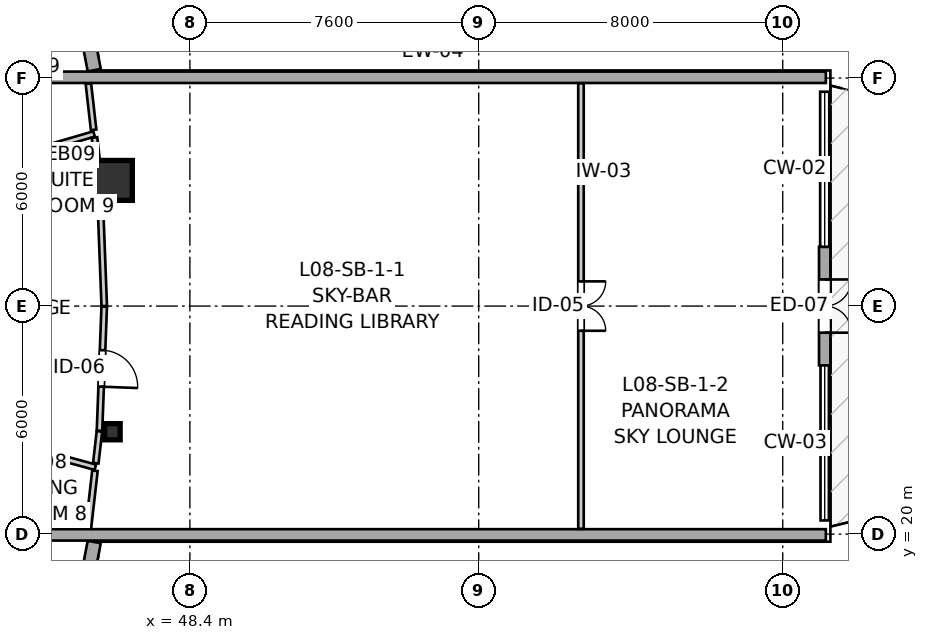
"""IFC4 building model, lengths in metres.
Left out: names, types, materials, properties, quantities, classifications, styles, units other than length and angle.
Written with IfcOpenShell. Run it as: python <this file> out.ifc"""

import sys

from ifc_helpers import new_model, si_unit, direction, frame, frame_2d, origin, origin_2d, place, context, subcontext, project, spatial, rectangle, i_section, extrude, source, transform, mapped, element, fill, save


model = new_model("IFC4")
c1 = context("Model", 3, precision=1e-05, world=origin(), true_north=direction((0.0, 1.0)))
c2 = subcontext(c1, "Body", "Model", "MODEL_VIEW")
j1 = project(units=[si_unit("LENGTHUNIT", "METRE"), si_unit("PLANEANGLEUNIT", "RADIAN")], contexts=[c1])
p1 = place(None, origin())
s1 = spatial("IfcSite", under=j1, at=p1, CompositionType="ELEMENT")
p2 = place(p1, origin())
s2 = spatial("IfcBuilding", under=s1, at=p2, CompositionType="ELEMENT")
p3 = place(p2, frame((0.0, 0.0, 30.2)))
s3 = spatial("IfcBuildingStorey", under=s2, at=p3, CompositionType="ELEMENT", Elevation=30.2)
m1 = source(origin(), c2, "Body", "SweptSolid", [
    extrude(i_section(OverallWidth=0.409, OverallDepth=0.425, WebThickness=0.03, FlangeThickness=0.048, FilletRadius=0.015, at=origin_2d()), origin(), (0.0, 0.0, 1.0), 2.935),
])
p4 = place(p3, frame((46.361, 22.694, 0.0), z_axis=(0.0, 0.0, 1.0), x_axis=(1.0, 0.0, 0.0)))
e1 = element("IfcColumn", 1, at=p4, inside=s3, PredefinedType="PILASTER", context=c2, shape_type="MappedRepresentation", body=[
    mapped(m1, transform((0.0, 0.0, 0.0), x_axis=(1.0, 0.0, 0.0), y_axis=(0.0, 1.0, 0.0), z_axis=(0.0, 0.0, 1.0), scale=1.0)),
])
m2 = source(origin(), c2, "Body", "SweptSolid", [
    extrude(rectangle(XDim=1.05, YDim=1.05, at=origin_2d()), origin(), (0.0, 0.0, 1.0), 2.935),
])
p5 = place(p3, frame((46.361, 29.306, 0.0), z_axis=(0.0, 0.0, 1.0), x_axis=(1.0, 0.0, 0.0)))
e2 = element("IfcColumn", 2, at=p5, inside=s3, PredefinedType="COLUMN", context=c2, shape_type="MappedRepresentation", body=[
    mapped(m2, transform((0.0, 0.0, 0.0), x_axis=(1.0, 0.0, 0.0), y_axis=(0.0, 1.0, 0.0), z_axis=(0.0, 0.0, 1.0), scale=1.0)),
])
p6 = place(p3, frame((45.24, 16.408, 0.0), z_axis=(0.0, 0.0, 1.0), x_axis=(0.186636709983, 0.982428999209, 0.0)))
e3 = element("IfcWall", 3, at=p6, inside=s3, PredefinedType="SOLIDWALL", context=c2, shape_type="SweptSolid", body=[
    extrude(rectangle(XDim=3.446, YDim=0.35, at=frame_2d((1.723, 0.0))), origin(), (0.0, 0.0, 1.0), 2.415),
])
p7 = place(p6, frame((0.828, 0.0, 0.82)))
e4 = element("IfcOpeningElement", 4, at=p7, cuts=e3, PredefinedType="OPENING", context=c2, shape_type="SweptSolid", body=[
    extrude(rectangle(XDim=1.45, YDim=1.25, at=frame_2d((0.725, 0.625))), frame((0.0, 0.185, 0.0), z_axis=(0.0, -1.0, 0.0), x_axis=(1.0, 0.0, 0.0)), (0.0, 0.0, 1.0), 0.37),
])
p8 = place(p3, frame((45.883, 32.207, 0.0), z_axis=(0.0, 0.0, 1.0), x_axis=(-0.186693533797, 0.982418202416, 0.0)))
e5 = element("IfcWall", 5, at=p8, inside=s3, PredefinedType="SOLIDWALL", context=c2, shape_type="SweptSolid", body=[
    extrude(rectangle(XDim=3.726, YDim=0.35, at=frame_2d((1.863, 0.0))), origin(), (0.0, 0.0, 1.0), 2.415),
])
p9 = place(p8, frame((1.313, 0.0, 0.82)))
e6 = element("IfcOpeningElement", 6, at=p9, cuts=e5, PredefinedType="OPENING", context=c2, shape_type="SweptSolid", body=[
    extrude(rectangle(XDim=1.45, YDim=1.25, at=frame_2d((0.725, 0.625))), frame((0.0, 0.185, 0.0), z_axis=(0.0, -1.0, 0.0), x_axis=(1.0, 0.0, 0.0)), (0.0, 0.0, 1.0), 0.37),
])
for number, where, z_axis, x_axis in (
    (7, (44.45, 32.02, 0.0), (0.0, 0.0, 1.0), (1.0, 0.0, 0.0)),
    (8, (44.45, 19.98, 0.0), (0.0, 0.0, 1.0), (1.0, 0.0, 0.0)),
):
    element("IfcWall", number, at=place(p3, frame(where, z_axis=z_axis, x_axis=x_axis)), inside=s3, PredefinedType="SOLIDWALL", context=c2, shape_type="SweptSolid", body=[
        extrude(rectangle(XDim=20.685, YDim=0.3, at=frame_2d((10.342, 0.0))), origin(), (0.0, 0.0, 1.0), 2.115),
    ])
p10 = place(p3, frame((65.104, 27.56, 0.0), z_axis=(0.0, 0.0, 1.0), x_axis=(0.0, -1.0, 0.0)))
e9 = element("IfcWall", 9, at=p10, inside=s3, PredefinedType="SOLIDWALL", context=c2, shape_type="SweptSolid", body=[
    extrude(rectangle(XDim=3.12, YDim=0.3, at=frame_2d((1.56, 0.0))), origin(), (0.0, 0.0, 1.0), 2.3),
])
p11 = place(p10, frame((0.86, 0.0, 0.0)))
e10 = element("IfcOpeningElement", 10, at=p11, cuts=e9, PredefinedType="OPENING", context=c2, shape_type="SweptSolid", body=[
    extrude(rectangle(XDim=1.4, YDim=2.15, at=frame_2d((0.7, 1.075))), frame((0.0, 0.16, 0.0), z_axis=(0.0, -1.0, 0.0), x_axis=(1.0, 0.0, 0.0)), (0.0, 0.0, 1.0), 0.32),
])
p12 = place(p3, frame((58.691, 31.862, 0.0), z_axis=(0.0, 0.0, 1.0), x_axis=(0.0, -1.0, 0.0)))
e11 = element("IfcWall", 11, at=p12, inside=s3, PredefinedType="PARTITIONING", context=c2, shape_type="SweptSolid", body=[
    extrude(rectangle(XDim=11.724, YDim=0.145, at=frame_2d((5.862, 0.0))), origin(), (0.0, 0.0, 1.0), 2.353),
])
p13 = place(p12, frame((5.212, 0.0, 0.0)))
e12 = element("IfcOpeningElement", 12, at=p13, cuts=e11, PredefinedType="OPENING", context=c2, shape_type="SweptSolid", body=[
    extrude(rectangle(XDim=1.3, YDim=2.1, at=frame_2d((0.65, 1.05))), frame((0.0, 0.083, 0.0), z_axis=(0.0, -1.0, 0.0), x_axis=(1.0, 0.0, 0.0)), (0.0, 0.0, 1.0), 0.165),
])
p14 = place(p3, frame((46.146, 25.985, 0.0), z_axis=(0.0, 0.0, 1.0), x_axis=(-0.038094618751, -0.999274136572, 0.0)))
e13 = element("IfcWall", 13, at=p14, inside=s3, PredefinedType="PARTITIONING", context=c2, shape_type="SweptSolid", body=[
    extrude(rectangle(XDim=3.269, YDim=0.145, at=frame_2d((1.634, 0.0))), origin(), (0.0, 0.0, 1.0), 2.403),
])
p15 = place(p14, frame((1.147, 0.0, 0.0)))
e14 = element("IfcOpeningElement", 14, at=p15, cuts=e13, PredefinedType="OPENING", context=c2, shape_type="SweptSolid", body=[
    extrude(rectangle(XDim=0.96, YDim=2.1, at=frame_2d((0.48, 1.05))), frame((0.0, 0.083, 0.0), z_axis=(0.0, -1.0, 0.0), x_axis=(1.0, 0.0, 0.0)), (0.0, 0.0, 1.0), 0.165),
])
p16 = place(p3, frame((38.81, 32.306, 0.0), z_axis=(0.0, 0.0, 1.0), x_axis=(0.801799720797, 0.597592844443, 0.0)))
e15 = element("IfcWall", 15, at=p16, inside=s3, PredefinedType="PARTITIONING", context=c2, shape_type="SweptSolid", body=[
    extrude(rectangle(XDim=7.424, YDim=0.145, at=frame_2d((3.712, 0.0))), origin(), (0.0, 0.0, 1.0), 2.935),
])
p17 = place(p3, frame((38.788, 28.46, 0.0), z_axis=(0.0, 0.0, 1.0), x_axis=(0.959983709987, 0.280055845432, 0.0)))
e16 = element("IfcWall", 16, at=p17, inside=s3, PredefinedType="PARTITIONING", context=c2, shape_type="SweptSolid", body=[
    extrude(rectangle(XDim=7.386, YDim=0.145, at=frame_2d((3.693, 0.0))), origin(), (0.0, 0.0, 1.0), 2.935),
])
p18 = place(p3, frame((38.787, 23.701, 0.0), z_axis=(0.0, 0.0, 1.0), x_axis=(0.964810342249, -0.262946769308, 0.0)))
e17 = element("IfcWall", 17, at=p18, inside=s3, PredefinedType="PARTITIONING", context=c2, shape_type="SweptSolid", body=[
    extrude(rectangle(XDim=7.385, YDim=0.145, at=frame_2d((3.692, 0.0))), origin(), (0.0, 0.0, 1.0), 2.935),
])
p19 = place(p3, frame((46.021, 29.281, 0.0), z_axis=(0.0, 0.0, 1.0), x_axis=(0.038070453861, -0.999275057501, 0.0)))
e18 = element("IfcWall", 18, at=p19, inside=s3, PredefinedType="PARTITIONING", context=c2, shape_type="SweptSolid", body=[
    extrude(rectangle(XDim=3.283, YDim=0.145, at=frame_2d((1.642, 0.0))), origin(), (0.0, 0.0, 1.0), 2.403),
])
p20 = place(p3, frame((45.729, 20.146, 0.0), z_axis=(0.0, 0.0, 1.0), x_axis=(0.113074294354, 0.993586535716, 0.0)))
e19 = element("IfcWall", 19, at=p20, inside=s3, PredefinedType="PARTITIONING", context=c2, shape_type="SweptSolid", body=[
    extrude(rectangle(XDim=1.531, YDim=0.145, at=frame_2d((0.765, 0.0))), origin(), (0.0, 0.0, 1.0), 2.403),
])
p21 = place(p3, frame((45.89, 30.436, 0.0), z_axis=(0.0, 0.0, 1.0), x_axis=(0.113024308153, -0.993592223081, 0.0)))
e20 = element("IfcWall", 20, at=p21, inside=s3, PredefinedType="PARTITIONING", context=c2, shape_type="SweptSolid", body=[
    extrude(rectangle(XDim=1.147, YDim=0.145, at=frame_2d((0.573, 0.0))), origin(), (0.0, 0.0, 1.0), 2.403),
])
p22 = place(p3, frame((45.729, 31.854, 0.0), z_axis=(0.0, 0.0, 1.0), x_axis=(0.112860473391, -0.993610846129, 0.0)))
e21 = element("IfcWall", 21, at=p22, inside=s3, PredefinedType="PARTITIONING", context=c2, shape_type="SweptSolid", body=[
    extrude(rectangle(XDim=1.224, YDim=0.145, at=frame_2d((0.612, 0.0))), origin(), (0.0, 0.0, 1.0), 2.403),
])
p23 = place(p3, frame((45.924, 21.866, 0.0), z_axis=(0.0, 0.0, 1.0), x_axis=(0.112844765803, 0.993612630169, 0.0)))
e22 = element("IfcWall", 22, at=p23, inside=s3, PredefinedType="PARTITIONING", context=c2, shape_type="SweptSolid", body=[
    extrude(rectangle(XDim=0.844, YDim=0.145, at=frame_2d((0.422, 0.0))), origin(), (0.0, 0.0, 1.0), 2.403),
])
m3 = source(origin(), c2, "Body", "SweptSolid", [
    extrude(rectangle(XDim=1.4, YDim=2.15, at=frame_2d((0.7, 1.075))), frame((0.0, 0.025, 0.0), z_axis=(0.0, -1.0, 0.0), x_axis=(1.0, 0.0, 0.0)), (0.0, 0.0, 1.0), 0.05),
])
p24 = place(p11, origin())
e23 = element("IfcDoor", 23, at=p24, inside=s3, OperationType="DOUBLE_DOOR_SINGLE_SWING", PredefinedType="DOOR", context=c2, shape_type="MappedRepresentation", body=[
    mapped(m3, transform((0.0, 0.0, 0.0), x_axis=(1.0, 0.0, 0.0), y_axis=(0.0, 1.0, 0.0), z_axis=(0.0, 0.0, 1.0), scale=1.0)),
])
fill(e10, e23)
m4 = source(origin(), c2, "Body", "SweptSolid", [
    extrude(rectangle(XDim=1.3, YDim=2.1, at=frame_2d((0.65, 1.05))), frame((0.0, 0.025, 0.0), z_axis=(0.0, -1.0, 0.0), x_axis=(1.0, 0.0, 0.0)), (0.0, 0.0, 1.0), 0.05),
])
p25 = place(p13, origin())
e24 = element("IfcDoor", 24, at=p25, inside=s3, OperationType="DOUBLE_DOOR_SINGLE_SWING", PredefinedType="DOOR", context=c2, shape_type="MappedRepresentation", body=[
    mapped(m4, transform((0.0, 0.0, 0.0), x_axis=(1.0, 0.0, 0.0), y_axis=(0.0, 1.0, 0.0), z_axis=(0.0, 0.0, 1.0), scale=1.0)),
])
fill(e12, e24)
m5 = source(origin(), c2, "Body", "SweptSolid", [
    extrude(rectangle(XDim=0.96, YDim=2.1, at=frame_2d((0.48, 1.05))), frame((0.0, 0.025, 0.0), z_axis=(0.0, -1.0, 0.0), x_axis=(1.0, 0.0, 0.0)), (0.0, 0.0, 1.0), 0.05),
])
p26 = place(p15, origin())
e25 = element("IfcDoor", 25, at=p26, inside=s3, OperationType="SINGLE_SWING_RIGHT", PredefinedType="DOOR", context=c2, shape_type="MappedRepresentation", body=[
    mapped(m5, transform((0.0, 0.0, 0.0), x_axis=(1.0, 0.0, 0.0), y_axis=(0.0, 1.0, 0.0), z_axis=(0.0, 0.0, 1.0), scale=1.0)),
])
fill(e14, e25)
save(model, sys.argv[1])
